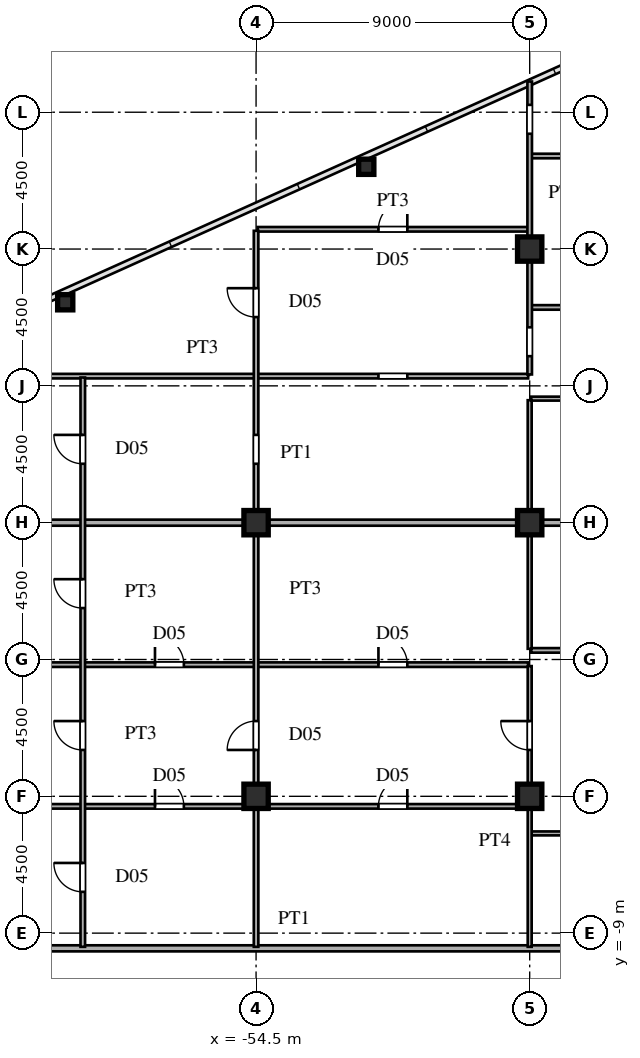
"""IFC4 building model, lengths in metres.
Left out: names, types, materials, properties, quantities, classifications, styles, units other than length and angle.
Written with IfcOpenShell. Run it as: python <this file> out.ifc"""

import sys

from ifc_helpers import new_model, si_unit, direction, frame, frame_2d, origin, origin_2d, place, context, subcontext, project, spatial, rectangle, hollow_rectangle, i_section, extrude, source, transform, mapped, element, fill, save


model = new_model("IFC4")
c1 = context("Model", 3, precision=1e-05, world=origin(), true_north=direction((0.0, 1.0)))
c2 = subcontext(c1, "Body", "Model", "MODEL_VIEW")
j1 = project(units=[si_unit("LENGTHUNIT", "METRE"), si_unit("PLANEANGLEUNIT", "RADIAN")], contexts=[c1])
p1 = place(None, origin())
s1 = spatial("IfcSite", under=j1, at=p1, CompositionType="ELEMENT")
p2 = place(p1, origin())
s2 = spatial("IfcBuilding", under=s1, at=p2, CompositionType="ELEMENT")
p3 = place(p2, frame((0.0, 0.0, 83.7)))
s3 = spatial("IfcBuildingStorey", under=s2, at=p3, CompositionType="ELEMENT", Elevation=83.7)
m1 = source(origin(), c2, "Body", "SweptSolid", [
    extrude(i_section(OverallWidth=0.8, OverallDepth=0.8, WebThickness=0.032, FlangeThickness=0.05, at=origin_2d()), origin(), (0.0, 0.0, 1.0), 3.6),
])
for number, where, z_axis, x_axis in (
    (1, (-45.5, -4.5, 0.0), (0.0, 0.0, 1.0), (1.0, 0.0, 0.0)),
    (2, (-45.5, 4.5, 0.0), (0.0, 0.0, 1.0), (1.0, 0.0, 0.0)),
    (3, (-45.5, 13.5, 0.0), (0.0, 0.0, 1.0), (1.0, 0.0, 0.0)),
    (4, (-54.5, -4.5, 0.0), (0.0, 0.0, 1.0), (1.0, 0.0, 0.0)),
    (5, (-54.5, 4.5, 0.0), (0.0, 0.0, 1.0), (1.0, 0.0, 0.0)),
):
    element("IfcColumn", number, at=place(p3, frame(where, z_axis=z_axis, x_axis=x_axis)), inside=s3, PredefinedType="COLUMN", context=c2, shape_type="MappedRepresentation", body=[
        mapped(m1, transform((0.0, 0.0, 0.0), scale=1.0)),
    ])
m2 = source(origin(), c2, "Body", "SweptSolid", [
    extrude(hollow_rectangle(XDim=0.5, YDim=0.5, WallThickness=0.02, at=origin_2d()), origin(), (0.0, 0.0, 1.0), 3.6),
])
for number, where, z_axis, x_axis in (
    (6, (-50.875, 16.205, 0.0), (0.0, 0.0, 1.0), (1.0, 0.0, 0.0)),
    (7, (-60.778, 11.749, 0.0), (0.0, 0.0, 1.0), (1.0, 0.0, 0.0)),
):
    element("IfcColumn", number, at=place(p3, frame(where, z_axis=z_axis, x_axis=x_axis)), inside=s3, PredefinedType="COLUMN", context=c2, shape_type="MappedRepresentation", body=[
        mapped(m2, transform((0.0, 0.0, 0.0), scale=1.0)),
    ])
p4 = place(p3, frame((-66.568, -9.5, 0.0), z_axis=(0.0, 0.0, 1.0), x_axis=(1.0, 0.0, 0.0)))
e8 = element("IfcWall", 8, at=p4, inside=s3, PredefinedType="PARTITIONING", context=c2, shape_type="SweptSolid", body=[
    extrude(rectangle(XDim=26.638, YDim=0.2, at=frame_2d((13.319, 0.0))), origin(), (0.0, 0.0, 1.0), 3.34),
])
p5 = place(p3, frame((-45.45, -5.72, 0.0), z_axis=(0.0, 0.0, 1.0), x_axis=(1.0, 0.0, 0.0)))
e9 = element("IfcWall", 9, at=p5, inside=s3, PredefinedType="PARTITIONING", context=c2, shape_type="SweptSolid", body=[
    extrude(rectangle(XDim=5.55, YDim=0.13, at=frame_2d((2.775, 0.0))), origin(), (0.0, 0.0, 1.0), 3.34),
])
p6 = place(p5, frame((2.335, 0.0, 0.0)))
e10 = element("IfcOpeningElement", 10, at=p6, cuts=e9, PredefinedType="OPENING", context=c2, shape_type="SweptSolid", body=[
    extrude(rectangle(XDim=0.88, YDim=2.1, at=frame_2d((0.44, 1.05))), frame((0.0, 0.075, 0.0), z_axis=(0.0, -1.0, 0.0), x_axis=(1.0, 0.0, 0.0)), (0.0, 0.0, 1.0), 0.15),
])
p7 = place(p3, frame((-71.035, -4.83, 0.0), z_axis=(0.0, 0.0, 1.0), x_axis=(1.0, 0.0, 0.0)))
e11 = element("IfcWall", 11, at=p7, inside=s3, PredefinedType="PARTITIONING", context=c2, shape_type="SweptSolid", body=[
    extrude(rectangle(XDim=25.485, YDim=0.15, at=frame_2d((12.742, 0.0))), origin(), (0.0, 0.0, 1.0), 3.34),
])
p8 = place(p7, frame((20.56, 0.0, 0.0)))
e12 = element("IfcOpeningElement", 12, at=p8, cuts=e11, PredefinedType="OPENING", context=c2, shape_type="SweptSolid", body=[
    extrude(rectangle(XDim=0.95, YDim=2.15, at=frame_2d((0.475, 1.075))), frame((0.0, 0.085, 0.0), z_axis=(0.0, -1.0, 0.0), x_axis=(1.0, 0.0, 0.0)), (0.0, 0.0, 1.0), 0.17),
])
p9 = place(p7, frame((13.21, 0.0, 0.0)))
e13 = element("IfcOpeningElement", 13, at=p9, cuts=e11, PredefinedType="OPENING", context=c2, shape_type="SweptSolid", body=[
    extrude(rectangle(XDim=0.95, YDim=2.15, at=frame_2d((0.475, 1.075))), frame((0.0, 0.085, 0.0), z_axis=(0.0, -1.0, 0.0), x_axis=(1.0, 0.0, 0.0)), (0.0, 0.0, 1.0), 0.17),
])
p10 = place(p3, frame((-71.035, -0.17, 0.0), z_axis=(0.0, 0.0, 1.0), x_axis=(1.0, 0.0, 0.0)))
e14 = element("IfcWall", 14, at=p10, inside=s3, PredefinedType="PARTITIONING", context=c2, shape_type="SweptSolid", body=[
    extrude(rectangle(XDim=25.485, YDim=0.15, at=frame_2d((12.742, 0.0))), origin(), (0.0, 0.0, 1.0), 3.34),
])
p11 = place(p10, frame((20.56, 0.0, 0.0)))
e15 = element("IfcOpeningElement", 15, at=p11, cuts=e14, PredefinedType="OPENING", context=c2, shape_type="SweptSolid", body=[
    extrude(rectangle(XDim=0.95, YDim=2.15, at=frame_2d((0.475, 1.075))), frame((0.0, 0.085, 0.0), z_axis=(0.0, -1.0, 0.0), x_axis=(1.0, 0.0, 0.0)), (0.0, 0.0, 1.0), 0.17),
])
p12 = place(p10, frame((13.21, 0.0, 0.0)))
e16 = element("IfcOpeningElement", 16, at=p12, cuts=e14, PredefinedType="OPENING", context=c2, shape_type="SweptSolid", body=[
    extrude(rectangle(XDim=0.95, YDim=2.15, at=frame_2d((0.475, 1.075))), frame((0.0, 0.085, 0.0), z_axis=(0.0, -1.0, 0.0), x_axis=(1.0, 0.0, 0.0)), (0.0, 0.0, 1.0), 0.17),
])
p13 = place(p3, frame((-45.45, 0.3, 0.0), z_axis=(0.0, 0.0, 1.0), x_axis=(1.0, 0.0, 0.0)))
e17 = element("IfcWall", 17, at=p13, inside=s3, PredefinedType="PARTITIONING", context=c2, shape_type="SweptSolid", body=[
    extrude(rectangle(XDim=5.55, YDim=0.15, at=frame_2d((2.775, 0.0))), origin(), (0.0, 0.0, 1.0), 3.34),
])
p14 = place(p13, frame((2.3, 0.0, 0.0)))
e18 = element("IfcOpeningElement", 18, at=p14, cuts=e17, PredefinedType="OPENING", context=c2, shape_type="SweptSolid", body=[
    extrude(rectangle(XDim=0.95, YDim=2.15, at=frame_2d((0.475, 1.075))), frame((0.0, 0.085, 0.0), z_axis=(0.0, -1.0, 0.0), x_axis=(1.0, 0.0, 0.0)), (0.0, 0.0, 1.0), 0.17),
])
p15 = place(p3, frame((-71.005, 4.5, 0.0), z_axis=(0.0, 0.0, 1.0), x_axis=(1.0, 0.0, 0.0)))
e19 = element("IfcWall", 19, at=p15, inside=s3, PredefinedType="PARTITIONING", context=c2, shape_type="SweptSolid", body=[
    extrude(rectangle(XDim=16.485, YDim=0.2, at=frame_2d((8.242, 0.0))), origin(), (0.0, 0.0, 1.0), 3.34),
])
p16 = place(p3, frame((-54.52, 4.5, 0.0), z_axis=(0.0, 0.0, 1.0), x_axis=(1.0, 0.0, 0.0)))
e20 = element("IfcWall", 20, at=p16, inside=s3, PredefinedType="PARTITIONING", context=c2, shape_type="SweptSolid", body=[
    extrude(rectangle(XDim=14.59, YDim=0.2, at=frame_2d((7.295, 0.0))), origin(), (0.0, 0.0, 1.0), 2.44),
])
p17 = place(p3, frame((-45.45, 8.58, 0.0), z_axis=(0.0, 0.0, 1.0), x_axis=(1.0, 0.0, 0.0)))
e21 = element("IfcWall", 21, at=p17, inside=s3, PredefinedType="PARTITIONING", context=c2, shape_type="SweptSolid", body=[
    extrude(rectangle(XDim=5.55, YDim=0.13, at=frame_2d((2.775, 0.0))), origin(), (0.0, 0.0, 1.0), 3.34),
])
p18 = place(p17, frame((2.335, 0.0, 0.0)))
e22 = element("IfcOpeningElement", 22, at=p18, cuts=e21, PredefinedType="OPENING", context=c2, shape_type="SweptSolid", body=[
    extrude(rectangle(XDim=0.88, YDim=2.1, at=frame_2d((0.44, 1.05))), frame((0.0, 0.075, 0.0), z_axis=(0.0, -1.0, 0.0), x_axis=(1.0, 0.0, 0.0)), (0.0, 0.0, 1.0), 0.15),
])
p19 = place(p3, frame((-66.979, 9.32, 0.0), z_axis=(0.0, 0.0, 1.0), x_axis=(1.0, 0.0, 0.0)))
e23 = element("IfcWall", 23, at=p19, inside=s3, PredefinedType="PARTITIONING", context=c2, shape_type="SweptSolid", body=[
    extrude(rectangle(XDim=21.429, YDim=0.15, at=frame_2d((10.714, 0.0))), origin(), (0.0, 0.0, 1.0), 3.34),
])
p20 = place(p19, frame((16.504, 0.0, 0.0)))
e24 = element("IfcOpeningElement", 24, at=p20, cuts=e23, PredefinedType="OPENING", context=c2, shape_type="SweptSolid", body=[
    extrude(rectangle(XDim=0.95, YDim=2.15, at=frame_2d((0.475, 1.075))), frame((0.0, 0.085, 0.0), z_axis=(0.0, -1.0, 0.0), x_axis=(1.0, 0.0, 0.0)), (0.0, 0.0, 1.0), 0.17),
])
p21 = place(p3, frame((-45.45, 11.58, 0.0), z_axis=(0.0, 0.0, 1.0), x_axis=(1.0, 0.0, 0.0)))
e25 = element("IfcWall", 25, at=p21, inside=s3, PredefinedType="PARTITIONING", context=c2, shape_type="SweptSolid", body=[
    extrude(rectangle(XDim=5.55, YDim=0.15, at=frame_2d((2.775, 0.0))), origin(), (0.0, 0.0, 1.0), 3.34),
])
p22 = place(p21, frame((2.3, 0.0, 0.0)))
e26 = element("IfcOpeningElement", 26, at=p22, cuts=e25, PredefinedType="OPENING", context=c2, shape_type="SweptSolid", body=[
    extrude(rectangle(XDim=0.95, YDim=2.15, at=frame_2d((0.475, 1.075))), frame((0.0, 0.085, 0.0), z_axis=(0.0, -1.0, 0.0), x_axis=(1.0, 0.0, 0.0)), (0.0, 0.0, 1.0), 0.17),
])
p23 = place(p3, frame((-54.45, 14.15, 0.0), z_axis=(0.0, 0.0, 1.0), x_axis=(1.0, 0.0, 0.0)))
e27 = element("IfcWall", 27, at=p23, inside=s3, PredefinedType="PARTITIONING", context=c2, shape_type="SweptSolid", body=[
    extrude(rectangle(XDim=8.9, YDim=0.15, at=frame_2d((4.45, 0.0))), origin(), (0.0, 0.0, 1.0), 3.34),
])
p24 = place(p23, frame((3.975, 0.0, 0.0)))
e28 = element("IfcOpeningElement", 28, at=p24, cuts=e27, PredefinedType="OPENING", context=c2, shape_type="SweptSolid", body=[
    extrude(rectangle(XDim=0.95, YDim=2.15, at=frame_2d((0.475, 1.075))), frame((0.0, 0.085, 0.0), z_axis=(0.0, -1.0, 0.0), x_axis=(1.0, 0.0, 0.0)), (0.0, 0.0, 1.0), 0.17),
])
p25 = place(p3, frame((-45.45, 16.56, 0.0), z_axis=(0.0, 0.0, 1.0), x_axis=(1.0, 0.0, 0.0)))
e29 = element("IfcWall", 29, at=p25, inside=s3, PredefinedType="PARTITIONING", context=c2, shape_type="SweptSolid", body=[
    extrude(rectangle(XDim=5.6, YDim=0.15, at=frame_2d((2.8, 0.0))), origin(), (0.0, 0.0, 1.0), 3.34),
])
p26 = place(p3, frame((-60.2, -9.45, 0.0), z_axis=(0.0, 0.0, 1.0), x_axis=(0.0, 1.0, 0.0)))
e30 = element("IfcWall", 30, at=p26, inside=s3, PredefinedType="PARTITIONING", context=c2, shape_type="SweptSolid", body=[
    extrude(rectangle(XDim=18.725, YDim=0.15, at=frame_2d((9.362, 0.0))), origin(), (0.0, 0.0, 1.0), 3.34),
])
p27 = place(p26, frame((1.808, 0.0, 0.0)))
e31 = element("IfcOpeningElement", 31, at=p27, cuts=e30, PredefinedType="OPENING", context=c2, shape_type="SweptSolid", body=[
    extrude(rectangle(XDim=0.95, YDim=2.15, at=frame_2d((0.475, 1.075))), frame((0.0, 0.085, 0.0), z_axis=(0.0, -1.0, 0.0), x_axis=(1.0, 0.0, 0.0)), (0.0, 0.0, 1.0), 0.17),
])
p28 = place(p26, frame((6.475, 0.0, 0.0)))
e32 = element("IfcOpeningElement", 32, at=p28, cuts=e30, PredefinedType="OPENING", context=c2, shape_type="SweptSolid", body=[
    extrude(rectangle(XDim=0.95, YDim=2.15, at=frame_2d((0.475, 1.075))), frame((0.0, 0.085, 0.0), z_axis=(0.0, -1.0, 0.0), x_axis=(1.0, 0.0, 0.0)), (0.0, 0.0, 1.0), 0.17),
])
p29 = place(p26, frame((11.142, 0.0, 0.0)))
e33 = element("IfcOpeningElement", 33, at=p29, cuts=e30, PredefinedType="OPENING", context=c2, shape_type="SweptSolid", body=[
    extrude(rectangle(XDim=0.95, YDim=2.15, at=frame_2d((0.475, 1.075))), frame((0.0, 0.085, 0.0), z_axis=(0.0, -1.0, 0.0), x_axis=(1.0, 0.0, 0.0)), (0.0, 0.0, 1.0), 0.17),
])
p30 = place(p26, frame((15.887, 0.0, 0.0)))
e34 = element("IfcOpeningElement", 34, at=p30, cuts=e30, PredefinedType="OPENING", context=c2, shape_type="SweptSolid", body=[
    extrude(rectangle(XDim=0.95, YDim=2.15, at=frame_2d((0.475, 1.075))), frame((0.0, 0.085, 0.0), z_axis=(0.0, -1.0, 0.0), x_axis=(1.0, 0.0, 0.0)), (0.0, 0.0, 1.0), 0.17),
])
p31 = place(p3, frame((-54.5, -9.45, 0.0), z_axis=(0.0, 0.0, 1.0), x_axis=(0.0, 1.0, 0.0)))
e35 = element("IfcWall", 35, at=p31, inside=s3, PredefinedType="PARTITIONING", context=c2, shape_type="SweptSolid", body=[
    extrude(rectangle(XDim=4.93, YDim=0.15, at=frame_2d((2.465, 0.0))), origin(), (0.0, 0.0, 1.0), 3.34),
])
p32 = place(p3, frame((-54.5, -4.52, 0.0), z_axis=(0.0, 0.0, 1.0), x_axis=(0.0, 1.0, 0.0)))
e36 = element("IfcWall", 36, at=p32, inside=s3, PredefinedType="PARTITIONING", context=c2, shape_type="SweptSolid", body=[
    extrude(rectangle(XDim=9.04, YDim=0.15, at=frame_2d((4.52, 0.0))), origin(), (0.0, 0.0, 1.0), 2.44),
])
p33 = place(p32, frame((1.545, 0.0, 0.0)))
e37 = element("IfcOpeningElement", 37, at=p33, cuts=e36, PredefinedType="OPENING", context=c2, shape_type="SweptSolid", body=[
    extrude(rectangle(XDim=0.95, YDim=2.15, at=frame_2d((0.475, 1.075))), frame((0.0, 0.085, 0.0), z_axis=(0.0, -1.0, 0.0), x_axis=(1.0, 0.0, 0.0)), (0.0, 0.0, 1.0), 0.17),
])
p34 = place(p3, frame((-54.5, 4.52, 0.0), z_axis=(0.0, 0.0, 1.0), x_axis=(0.0, 1.0, 0.0)))
e38 = element("IfcWall", 38, at=p34, inside=s3, PredefinedType="PARTITIONING", context=c2, shape_type="SweptSolid", body=[
    extrude(rectangle(XDim=9.58, YDim=0.15, at=frame_2d((4.79, 0.0))), origin(), (0.0, 0.0, 1.0), 3.34),
])
p35 = place(p34, frame((6.742, 0.0, 0.0)))
e39 = element("IfcOpeningElement", 39, at=p35, cuts=e38, PredefinedType="OPENING", context=c2, shape_type="SweptSolid", body=[
    extrude(rectangle(XDim=0.95, YDim=2.15, at=frame_2d((0.475, 1.075))), frame((0.0, 0.085, 0.0), z_axis=(0.0, -1.0, 0.0), x_axis=(1.0, 0.0, 0.0)), (0.0, 0.0, 1.0), 0.17),
])
p36 = place(p34, frame((1.917, 0.0, 0.0)))
e40 = element("IfcOpeningElement", 40, at=p36, cuts=e38, PredefinedType="OPENING", context=c2, shape_type="SweptSolid", body=[
    extrude(rectangle(XDim=0.95, YDim=2.15, at=frame_2d((0.475, 1.075))), frame((0.0, 0.085, 0.0), z_axis=(0.0, -1.0, 0.0), x_axis=(1.0, 0.0, 0.0)), (0.0, 0.0, 1.0), 0.17),
])
p37 = place(p3, frame((-45.5, -9.45, 0.0), z_axis=(0.0, 0.0, 1.0), x_axis=(0.0, 1.0, 0.0)))
e41 = element("IfcWall", 41, at=p37, inside=s3, PredefinedType="PARTITIONING", context=c2, shape_type="SweptSolid", body=[
    extrude(rectangle(XDim=9.233, YDim=0.13, at=frame_2d((4.616, 0.0))), origin(), (0.0, 0.0, 1.0), 2.44),
])
p38 = place(p37, frame((6.475, 0.0, 0.0)))
e42 = element("IfcOpeningElement", 42, at=p38, cuts=e41, PredefinedType="OPENING", context=c2, shape_type="SweptSolid", body=[
    extrude(rectangle(XDim=0.95, YDim=2.15, at=frame_2d((0.475, 1.075))), frame((0.0, 0.075, 0.0), z_axis=(0.0, -1.0, 0.0), x_axis=(1.0, 0.0, 0.0)), (0.0, 0.0, 1.0), 0.15),
])
p39 = place(p3, frame((-45.5, 0.352, 0.0), z_axis=(0.0, 0.0, 1.0), x_axis=(0.0, 1.0, 0.0)))
e43 = element("IfcWall", 43, at=p39, inside=s3, PredefinedType="PARTITIONING", context=c2, shape_type="SweptSolid", body=[
    extrude(rectangle(XDim=8.176, YDim=0.13, at=frame_2d((4.088, 0.0))), origin(), (0.0, 0.0, 1.0), 2.44),
])
p40 = place(p3, frame((-45.5, 9.375, 0.0), z_axis=(0.0, 0.0, 1.0), x_axis=(0.0, 1.0, 0.0)))
e44 = element("IfcWall", 44, at=p40, inside=s3, PredefinedType="PARTITIONING", context=c2, shape_type="SweptSolid", body=[
    extrude(rectangle(XDim=4.145, YDim=0.15, at=frame_2d((2.073, 0.0))), origin(), (0.0, 0.0, 1.0), 2.44),
])
p41 = place(p40, frame((0.601, 0.0, 0.0)))
e45 = element("IfcOpeningElement", 45, at=p41, cuts=e44, PredefinedType="OPENING", context=c2, shape_type="SweptSolid", body=[
    extrude(rectangle(XDim=0.95, YDim=2.15, at=frame_2d((0.475, 1.075))), frame((0.0, 0.085, 0.0), z_axis=(0.0, -1.0, 0.0), x_axis=(1.0, 0.0, 0.0)), (0.0, 0.0, 1.0), 0.17),
])
p42 = place(p3, frame((-45.5, 13.52, 0.0), z_axis=(0.0, 0.0, 1.0), x_axis=(0.0, 1.0, 0.0)))
e46 = element("IfcWall", 46, at=p42, inside=s3, PredefinedType="PARTITIONING", context=c2, shape_type="SweptSolid", body=[
    extrude(rectangle(XDim=5.49, YDim=0.15, at=frame_2d((2.745, 0.0))), origin(), (0.0, 0.0, 1.0), 3.34),
])
p43 = place(p42, frame((3.772, 0.0, 0.0)))
e47 = element("IfcOpeningElement", 47, at=p43, cuts=e46, PredefinedType="OPENING", context=c2, shape_type="SweptSolid", body=[
    extrude(rectangle(XDim=0.95, YDim=2.15, at=frame_2d((0.475, 1.075))), frame((0.0, 0.085, 0.0), z_axis=(0.0, -1.0, 0.0), x_axis=(1.0, 0.0, 0.0)), (0.0, 0.0, 1.0), 0.17),
])
m3 = source(origin(), c2, "Body", "SweptSolid", [
    extrude(rectangle(XDim=0.95, YDim=2.15, at=frame_2d((0.475, 1.075))), frame((0.0, 0.025, 0.0), z_axis=(0.0, -1.0, 0.0), x_axis=(1.0, 0.0, 0.0)), (0.0, 0.0, 1.0), 0.05),
])
p44 = place(p8, origin())
e48 = element("IfcDoor", 48, at=p44, inside=s3, OperationType="SINGLE_SWING_RIGHT", PredefinedType="DOOR", context=c2, shape_type="MappedRepresentation", body=[
    mapped(m3, transform((0.0, 0.0, 0.0), scale=1.0)),
])
fill(e12, e48)
p45 = place(p9, origin())
e49 = element("IfcDoor", 49, at=p45, inside=s3, OperationType="SINGLE_SWING_LEFT", PredefinedType="DOOR", context=c2, shape_type="MappedRepresentation", body=[
    mapped(m3, transform((0.0, 0.0, 0.0), scale=1.0)),
])
fill(e13, e49)
p46 = place(p11, origin())
e50 = element("IfcDoor", 50, at=p46, inside=s3, OperationType="SINGLE_SWING_LEFT", PredefinedType="DOOR", context=c2, shape_type="MappedRepresentation", body=[
    mapped(m3, transform((0.0, 0.0, 0.0), scale=1.0)),
])
fill(e15, e50)
p47 = place(p12, origin())
e51 = element("IfcDoor", 51, at=p47, inside=s3, OperationType="SINGLE_SWING_LEFT", PredefinedType="DOOR", context=c2, shape_type="MappedRepresentation", body=[
    mapped(m3, transform((0.0, 0.0, 0.0), scale=1.0)),
])
fill(e16, e51)
p48 = place(p24, origin())
e52 = element("IfcDoor", 52, at=p48, inside=s3, OperationType="SINGLE_SWING_RIGHT", PredefinedType="DOOR", context=c2, shape_type="MappedRepresentation", body=[
    mapped(m3, transform((0.0, 0.0, 0.0), scale=1.0)),
])
fill(e28, e52)
p49 = place(p27, origin())
e53 = element("IfcDoor", 53, at=p49, inside=s3, OperationType="SINGLE_SWING_RIGHT", PredefinedType="DOOR", context=c2, shape_type="MappedRepresentation", body=[
    mapped(m3, transform((0.0, 0.0, 0.0), scale=1.0)),
])
fill(e31, e53)
p50 = place(p28, origin())
e54 = element("IfcDoor", 54, at=p50, inside=s3, OperationType="SINGLE_SWING_RIGHT", PredefinedType="DOOR", context=c2, shape_type="MappedRepresentation", body=[
    mapped(m3, transform((0.0, 0.0, 0.0), scale=1.0)),
])
fill(e32, e54)
p51 = place(p29, origin())
e55 = element("IfcDoor", 55, at=p51, inside=s3, OperationType="SINGLE_SWING_RIGHT", PredefinedType="DOOR", context=c2, shape_type="MappedRepresentation", body=[
    mapped(m3, transform((0.0, 0.0, 0.0), scale=1.0)),
])
fill(e33, e55)
p52 = place(p30, origin())
e56 = element("IfcDoor", 56, at=p52, inside=s3, OperationType="SINGLE_SWING_RIGHT", PredefinedType="DOOR", context=c2, shape_type="MappedRepresentation", body=[
    mapped(m3, transform((0.0, 0.0, 0.0), scale=1.0)),
])
fill(e34, e56)
p53 = place(p33, origin())
e57 = element("IfcDoor", 57, at=p53, inside=s3, OperationType="SINGLE_SWING_LEFT", PredefinedType="DOOR", context=c2, shape_type="MappedRepresentation", body=[
    mapped(m3, transform((0.0, 0.0, 0.0), scale=1.0)),
])
fill(e37, e57)
p54 = place(p35, origin())
e58 = element("IfcDoor", 58, at=p54, inside=s3, OperationType="SINGLE_SWING_RIGHT", PredefinedType="DOOR", context=c2, shape_type="MappedRepresentation", body=[
    mapped(m3, transform((0.0, 0.0, 0.0), scale=1.0)),
])
fill(e39, e58)
p55 = place(p38, origin())
e59 = element("IfcDoor", 59, at=p55, inside=s3, OperationType="SINGLE_SWING_RIGHT", PredefinedType="DOOR", context=c2, shape_type="MappedRepresentation", body=[
    mapped(m3, transform((0.0, 0.0, 0.0), scale=1.0)),
])
fill(e42, e59)
save(model, sys.argv[1])
